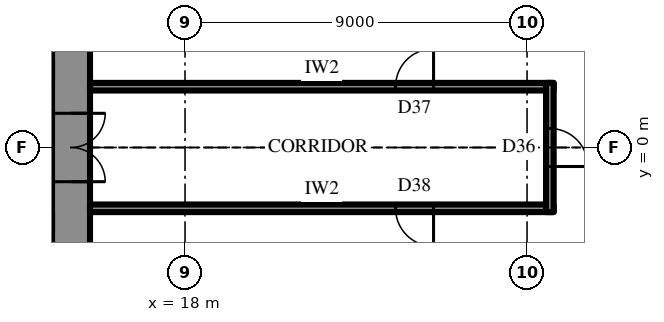
"""IFC4 building model, lengths in metres.
Left out: names, types, materials, properties, quantities, classifications, styles, units other than length and angle.
Written with IfcOpenShell. Run it as: python <this file> out.ifc"""

import sys

from ifc_helpers import new_model, si_unit, direction, frame, frame_2d, origin, place, context, subcontext, project, spatial, rectangle, extrude, element, fill, save


model = new_model("IFC4")
c1 = context("Model", 3, precision=1e-05, world=origin(), true_north=direction((0.0, 1.0)))
c2 = subcontext(c1, "Body", "Model", "MODEL_VIEW")
j1 = project(units=[si_unit("LENGTHUNIT", "METRE"), si_unit("PLANEANGLEUNIT", "RADIAN")], contexts=[c1])
p1 = place(None, origin())
s1 = spatial("IfcSite", under=j1, at=p1, CompositionType="ELEMENT")
p2 = place(p1, origin())
s2 = spatial("IfcBuilding", under=s1, at=p2, CompositionType="ELEMENT")
p3 = place(p2, frame((0.0, 0.0, 291.1)))
s3 = spatial("IfcBuildingStorey", under=s2, at=p3, CompositionType="ELEMENT", Elevation=291.1)
p4 = place(p3, frame((15.0, -10.7, 0.0), z_axis=(0.0, 0.0, 1.0), x_axis=(0.0, 1.0, 0.0)))
e1 = element("IfcWall", 1, at=p4, inside=s3, PredefinedType="SHEAR", context=c2, shape_type="SweptSolid", body=[
    extrude(rectangle(XDim=21.4, YDim=1.0, at=frame_2d((10.7, 0.0))), origin(), (0.0, 0.0, 1.0), 4.2),
])
p5 = place(p4, frame((9.8, 0.0, 0.0)))
e2 = element("IfcOpeningElement", 2, at=p5, cuts=e1, PredefinedType="OPENING", context=c2, shape_type="SweptSolid", body=[
    extrude(rectangle(XDim=1.8, YDim=2.4, at=frame_2d((0.9, 1.2))), frame((0.0, 0.51, 0.0), z_axis=(0.0, -1.0, 0.0), x_axis=(1.0, 0.0, 0.0)), (0.0, 0.0, 1.0), 1.02),
])
p6 = place(p3, frame((12.3, 2.0, 0.0), z_axis=(0.0, 0.0, 1.0), x_axis=(1.0, 0.0, 0.0)))
e3 = element("IfcWall", 3, at=p6, inside=s3, PredefinedType="SHEAR", context=c2, shape_type="SweptSolid", body=[
    extrude(rectangle(XDim=2.2, YDim=0.5, at=frame_2d((1.1, 0.0))), origin(), (0.0, 0.0, 1.0), 4.2),
])
p7 = place(p6, frame((0.8, 0.0, 0.0)))
e4 = element("IfcOpeningElement", 4, at=p7, cuts=e3, PredefinedType="OPENING", context=c2, shape_type="SweptSolid", body=[
    extrude(rectangle(XDim=0.9, YDim=2.2, at=frame_2d((0.45, 1.1))), frame((0.0, 0.26, 0.0), z_axis=(0.0, -1.0, 0.0), x_axis=(1.0, 0.0, 0.0)), (0.0, 0.0, 1.0), 0.52),
])
p8 = place(p3, frame((15.5, 1.6, 0.0), z_axis=(0.0, 0.0, 1.0), x_axis=(1.0, 0.0, 0.0)))
e5 = element("IfcWall", 5, at=p8, inside=s3, PredefinedType="PARTITIONING", context=c2, shape_type="SweptSolid", body=[
    extrude(rectangle(XDim=12.2, YDim=0.2, at=frame_2d((6.1, 0.0))), origin(), (0.0, 0.0, 1.0), 4.0),
])
p9 = place(p8, frame((8.04, 0.0, 0.0)))
e6 = element("IfcOpeningElement", 6, at=p9, cuts=e5, PredefinedType="OPENING", context=c2, shape_type="SweptSolid", body=[
    extrude(rectangle(XDim=1.0, YDim=2.2, at=frame_2d((0.5, 1.1))), frame((0.0, 0.11, 0.0), z_axis=(0.0, -1.0, 0.0), x_axis=(1.0, 0.0, 0.0)), (0.0, 0.0, 1.0), 0.22),
])
p10 = place(p3, frame((15.5, -1.6, 0.0), z_axis=(0.0, 0.0, 1.0), x_axis=(1.0, 0.0, 0.0)))
e7 = element("IfcWall", 7, at=p10, inside=s3, PredefinedType="PARTITIONING", context=c2, shape_type="SweptSolid", body=[
    extrude(rectangle(XDim=12.2, YDim=0.2, at=frame_2d((6.1, 0.0))), origin(), (0.0, 0.0, 1.0), 4.0),
])
p11 = place(p10, frame((8.04, 0.0, 0.0)))
e8 = element("IfcOpeningElement", 8, at=p11, cuts=e7, PredefinedType="OPENING", context=c2, shape_type="SweptSolid", body=[
    extrude(rectangle(XDim=1.0, YDim=2.2, at=frame_2d((0.5, 1.1))), frame((0.0, 0.11, 0.0), z_axis=(0.0, -1.0, 0.0), x_axis=(1.0, 0.0, 0.0)), (0.0, 0.0, 1.0), 0.22),
])
p12 = place(p3, frame((27.6, -1.7, 0.0), z_axis=(0.0, 0.0, 1.0), x_axis=(0.0, 1.0, 0.0)))
e9 = element("IfcWall", 9, at=p12, inside=s3, PredefinedType="PARTITIONING", context=c2, shape_type="SweptSolid", body=[
    extrude(rectangle(XDim=3.4, YDim=0.2, at=frame_2d((1.7, 0.0))), origin(), (0.0, 0.0, 1.0), 4.0),
])
p13 = place(p12, frame((1.2, 0.0, 0.0)))
e10 = element("IfcOpeningElement", 10, at=p13, cuts=e9, PredefinedType="OPENING", context=c2, shape_type="SweptSolid", body=[
    extrude(rectangle(XDim=1.0, YDim=2.2, at=frame_2d((0.5, 1.1))), frame((0.0, 0.11, 0.0), z_axis=(0.0, -1.0, 0.0), x_axis=(1.0, 0.0, 0.0)), (0.0, 0.0, 1.0), 0.22),
])
p14 = place(p5, frame((1.8, 0.0, 0.0), z_axis=(0.0, 0.0, 1.0), x_axis=(-1.0, 0.0, 0.0)))
e11 = element("IfcDoor", 11, at=p14, inside=s3, OperationType="DOUBLE_DOOR_SINGLE_SWING", PredefinedType="DOOR", context=c2, shape_type="SweptSolid", body=[
    extrude(rectangle(XDim=1.8, YDim=2.4, at=frame_2d((0.9, 1.2))), frame((0.0, 0.025, 0.0), z_axis=(0.0, -1.0, 0.0), x_axis=(1.0, 0.0, 0.0)), (0.0, 0.0, 1.0), 0.05),
])
fill(e2, e11)
p15 = place(p9, origin())
e12 = element("IfcDoor", 12, at=p15, inside=s3, OperationType="SINGLE_SWING_LEFT", PredefinedType="DOOR", context=c2, shape_type="SweptSolid", body=[
    extrude(rectangle(XDim=1.0, YDim=2.2, at=frame_2d((0.5, 1.1))), frame((0.0, 0.025, 0.0), z_axis=(0.0, -1.0, 0.0), x_axis=(1.0, 0.0, 0.0)), (0.0, 0.0, 1.0), 0.05),
])
fill(e6, e12)
p16 = place(p11, frame((1.0, 0.0, 0.0), z_axis=(0.0, 0.0, 1.0), x_axis=(-1.0, 0.0, 0.0)))
e13 = element("IfcDoor", 13, at=p16, inside=s3, OperationType="SINGLE_SWING_RIGHT", PredefinedType="DOOR", context=c2, shape_type="SweptSolid", body=[
    extrude(rectangle(XDim=1.0, YDim=2.2, at=frame_2d((0.5, 1.1))), frame((0.0, 0.025, 0.0), z_axis=(0.0, -1.0, 0.0), x_axis=(1.0, 0.0, 0.0)), (0.0, 0.0, 1.0), 0.05),
])
fill(e8, e13)
p17 = place(p13, frame((1.0, 0.0, 0.0), z_axis=(0.0, 0.0, 1.0), x_axis=(-1.0, 0.0, 0.0)))
e14 = element("IfcDoor", 14, at=p17, inside=s3, OperationType="SINGLE_SWING_LEFT", PredefinedType="DOOR", context=c2, shape_type="SweptSolid", body=[
    extrude(rectangle(XDim=1.0, YDim=2.2, at=frame_2d((0.5, 1.1))), frame((0.0, 0.025, 0.0), z_axis=(0.0, -1.0, 0.0), x_axis=(1.0, 0.0, 0.0)), (0.0, 0.0, 1.0), 0.05),
])
fill(e10, e14)
save(model, sys.argv[1])
